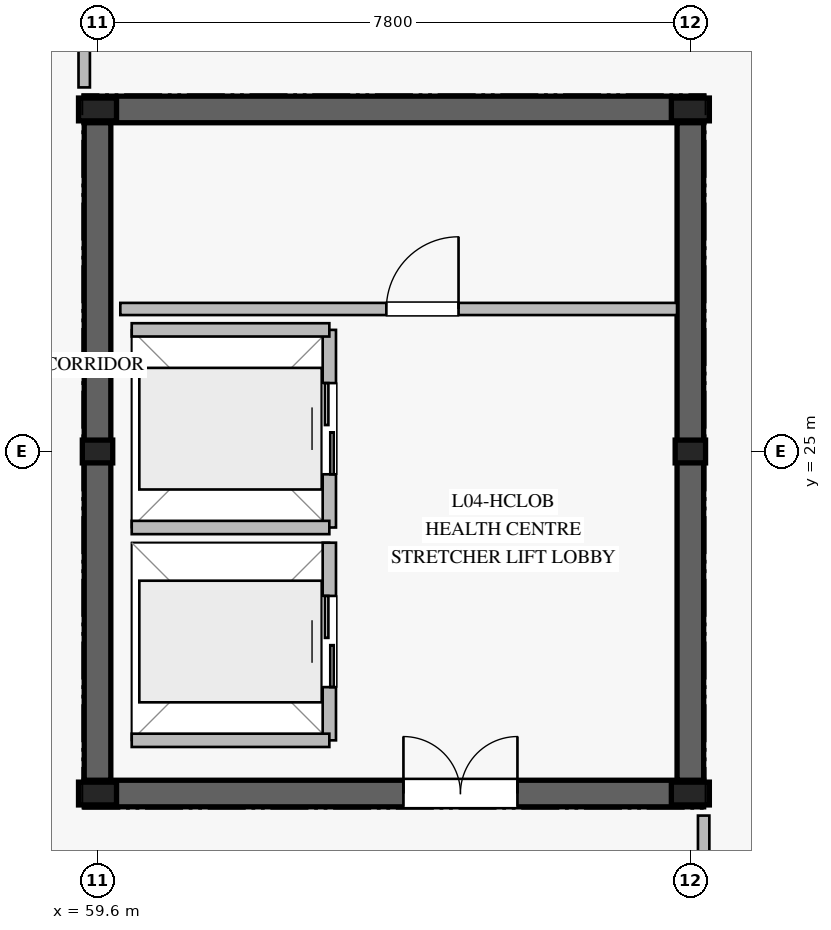
"""IFC4 building model, lengths in metres.
Left out: names, types, materials, properties, quantities, classifications, styles, units other than length and angle.
Written with IfcOpenShell. Run it as: python <this file> out.ifc"""

import sys

from ifc_helpers import new_model, si_unit, direction, frame, frame_2d, origin, origin_2d, place, context, subcontext, project, spatial, rectangle, i_section, extrude, element, fill, save


model = new_model("IFC4")
c1 = context("Model", 3, precision=1e-05, world=origin(), true_north=direction((0.0, 1.0)))
c2 = subcontext(c1, "Body", "Model", "MODEL_VIEW")
j1 = project(units=[si_unit("LENGTHUNIT", "METRE"), si_unit("PLANEANGLEUNIT", "RADIAN")], contexts=[c1])
p1 = place(None, origin())
s1 = spatial("IfcSite", under=j1, at=p1, CompositionType="ELEMENT")
p2 = place(p1, origin())
s2 = spatial("IfcBuilding", under=s1, at=p2, CompositionType="ELEMENT")
p3 = place(p2, frame((0.0, 0.0, 19.0)))
s3 = spatial("IfcBuildingStorey", under=s2, at=p3, CompositionType="ELEMENT", Elevation=19.0)
p4 = place(p3, frame((59.425, 20.5, 0.0), z_axis=(0.0, 0.0, 1.0), x_axis=(1.0, 0.0, 0.0)))
e1 = element("IfcWall", 1, at=p4, inside=s3, PredefinedType="SHEAR", context=c2, shape_type="SweptSolid", body=[
    extrude(rectangle(XDim=8.15, YDim=0.35, at=frame_2d((4.075, 0.0))), origin(), (0.0, 0.0, 1.0), 4.73),
])
p5 = place(p4, frame((4.2, 0.0, 0.0)))
e2 = element("IfcOpeningElement", 2, at=p5, cuts=e1, PredefinedType="OPENING", context=c2, shape_type="SweptSolid", body=[
    extrude(rectangle(XDim=1.5, YDim=2.2, at=frame_2d((0.75, 1.1))), frame((0.0, 0.185, 0.0), z_axis=(0.0, -1.0, 0.0), x_axis=(1.0, 0.0, 0.0)), (0.0, 0.0, 1.0), 0.37),
])
p6 = place(p3, frame((67.575, 29.5, 0.0), z_axis=(0.0, 0.0, 1.0), x_axis=(-1.0, 0.0, 0.0)))
e3 = element("IfcWall", 3, at=p6, inside=s3, PredefinedType="SHEAR", context=c2, shape_type="SweptSolid", body=[
    extrude(rectangle(XDim=8.15, YDim=0.35, at=frame_2d((4.075, 0.0))), origin(), (0.0, 0.0, 1.0), 4.73),
])
for number, where, z_axis, x_axis in (
    (4, (59.6, 29.325, 0.0), (0.0, 0.0, 1.0), (0.0, -1.0, 0.0)),
    (5, (67.4, 20.675, 0.0), (0.0, 0.0, 1.0), (0.0, 1.0, 0.0)),
):
    element("IfcWall", number, at=place(p3, frame(where, z_axis=z_axis, x_axis=x_axis)), inside=s3, PredefinedType="SHEAR", context=c2, shape_type="SweptSolid", body=[
        extrude(rectangle(XDim=8.65, YDim=0.35, at=frame_2d((4.325, 0.0))), origin(), (0.0, 0.0, 1.0), 4.73),
    ])
for number, where, z_axis, x_axis in (
    (6, (59.6, 20.5, 0.0), (0.0, 0.0, 1.0), (1.0, 0.0, 0.0)),
    (7, (67.4, 20.5, 0.0), (0.0, 0.0, 1.0), (1.0, 0.0, 0.0)),
    (8, (67.4, 29.5, 0.0), (0.0, 0.0, 1.0), (1.0, 0.0, 0.0)),
    (9, (59.6, 29.5, 0.0), (0.0, 0.0, 1.0), (1.0, 0.0, 0.0)),
):
    element("IfcColumn", number, at=place(p3, frame(where, z_axis=z_axis, x_axis=x_axis)), inside=s3, PredefinedType="COLUMN", context=c2, shape_type="SweptSolid", body=[
        extrude(i_section(OverallWidth=0.3, OverallDepth=0.5, WebThickness=0.014, FlangeThickness=0.028, at=origin_2d()), origin(), (0.0, 0.0, 1.0), 5.0),
    ])
for number, where, z_axis, x_axis in (
    (10, (59.6, 25.0, 0.0), (0.0, 0.0, 1.0), (1.0, 0.0, 0.0)),
    (11, (67.4, 25.0, 0.0), (0.0, 0.0, 1.0), (1.0, 0.0, 0.0)),
):
    element("IfcColumn", number, at=place(p3, frame(where, z_axis=z_axis, x_axis=x_axis)), inside=s3, PredefinedType="COLUMN", context=c2, shape_type="SweptSolid", body=[
        extrude(i_section(OverallWidth=0.3, OverallDepth=0.4, WebThickness=0.013, FlangeThickness=0.024, at=origin_2d()), origin(), (0.0, 0.0, 1.0), 4.77),
    ])
p7 = place(p3, frame((62.65, 21.2, 0.0), z_axis=(0.0, 0.0, 1.0), x_axis=(0.0, 1.0, 0.0)))
e12 = element("IfcWall", 12, at=p7, inside=s3, PredefinedType="PARTITIONING", context=c2, shape_type="SweptSolid", body=[
    extrude(rectangle(XDim=2.6, YDim=0.175, at=frame_2d((1.3, 0.0))), origin(), (0.0, 0.0, 1.0), 4.76),
])
p8 = place(p7, frame((0.7, 0.0, 0.0)))
e13 = element("IfcOpeningElement", 13, at=p8, cuts=e12, PredefinedType="OPENING", context=c2, shape_type="SweptSolid", body=[
    extrude(rectangle(XDim=1.2, YDim=2.2, at=frame_2d((0.6, 1.1))), frame((0.0, 0.098, 0.0), z_axis=(0.0, -1.0, 0.0), x_axis=(1.0, 0.0, 0.0)), (0.0, 0.0, 1.0), 0.195),
])
p9 = place(p3, frame((60.05, 21.2, 0.0), z_axis=(0.0, 0.0, 1.0), x_axis=(1.0, 0.0, 0.0)))
e14 = element("IfcWall", 14, at=p9, inside=s3, PredefinedType="PARTITIONING", context=c2, shape_type="SweptSolid", body=[
    extrude(rectangle(XDim=2.6, YDim=0.175, at=frame_2d((1.3, 0.0))), origin(), (0.0, 0.0, 1.0), 4.76),
])
p10 = place(p3, frame((62.65, 24.0, 0.0), z_axis=(0.0, 0.0, 1.0), x_axis=(0.0, 1.0, 0.0)))
e15 = element("IfcWall", 15, at=p10, inside=s3, PredefinedType="PARTITIONING", context=c2, shape_type="SweptSolid", body=[
    extrude(rectangle(XDim=2.6, YDim=0.175, at=frame_2d((1.3, 0.0))), origin(), (0.0, 0.0, 1.0), 4.41),
])
p11 = place(p10, frame((0.7, 0.0, 0.0)))
e16 = element("IfcOpeningElement", 16, at=p11, cuts=e15, PredefinedType="OPENING", context=c2, shape_type="SweptSolid", body=[
    extrude(rectangle(XDim=1.2, YDim=2.2, at=frame_2d((0.6, 1.1))), frame((0.0, 0.098, 0.0), z_axis=(0.0, -1.0, 0.0), x_axis=(1.0, 0.0, 0.0)), (0.0, 0.0, 1.0), 0.195),
])
for number, where, z_axis, x_axis in (
    (17, (60.05, 24.0, 0.0), (0.0, 0.0, 1.0), (1.0, 0.0, 0.0)),
    (18, (60.05, 26.6, 0.0), (0.0, 0.0, 1.0), (1.0, 0.0, 0.0)),
):
    element("IfcWall", number, at=place(p3, frame(where, z_axis=z_axis, x_axis=x_axis)), inside=s3, PredefinedType="PARTITIONING", context=c2, shape_type="SweptSolid", body=[
        extrude(rectangle(XDim=2.6, YDim=0.175, at=frame_2d((1.3, 0.0))), origin(), (0.0, 0.0, 1.0), 4.76),
    ])
p12 = place(p3, frame((59.9, 26.875, 0.0), z_axis=(0.0, 0.0, 1.0), x_axis=(1.0, 0.0, 0.0)))
e19 = element("IfcWall", 19, at=p12, inside=s3, PredefinedType="PLUMBINGWALL", context=c2, shape_type="SweptSolid", body=[
    extrude(rectangle(XDim=7.325, YDim=0.16, at=frame_2d((3.663, 0.0))), origin(), (0.0, 0.0, 1.0), 4.41),
])
p13 = place(p12, frame((3.5, 0.0, 0.0)))
e20 = element("IfcOpeningElement", 20, at=p13, cuts=e19, PredefinedType="OPENING", context=c2, shape_type="SweptSolid", body=[
    extrude(rectangle(XDim=0.95, YDim=2.1, at=frame_2d((0.475, 1.05))), frame((0.0, 0.09, 0.0), z_axis=(0.0, -1.0, 0.0), x_axis=(1.0, 0.0, 0.0)), (0.0, 0.0, 1.0), 0.18),
])
p14 = place(p3, frame((59.425, 29.79, 0.0), z_axis=(0.0, 0.0, 1.0), x_axis=(0.0, 1.0, 0.0)))
e21 = element("IfcWall", 21, at=p14, inside=s3, PredefinedType="PARTITIONING", context=c2, shape_type="SweptSolid", body=[
    extrude(rectangle(XDim=0.97, YDim=0.15, at=frame_2d((0.485, 0.0))), origin(), (0.0, 0.0, 1.0), 4.41),
])
p15 = place(p3, frame((67.575, 19.24, 0.0), z_axis=(0.0, 0.0, 1.0), x_axis=(0.0, 1.0, 0.0)))
e22 = element("IfcWall", 22, at=p15, inside=s3, PredefinedType="PARTITIONING", context=c2, shape_type="SweptSolid", body=[
    extrude(rectangle(XDim=0.97, YDim=0.15, at=frame_2d((0.485, 0.0))), origin(), (0.0, 0.0, 1.0), 4.37),
])
p16 = place(p8, origin())
e23 = element("IfcDoor", 23, at=p16, inside=s3, OperationType="DOUBLE_DOOR_SLIDING", PredefinedType="DOOR", context=c2, shape_type="SweptSolid", body=[
    extrude(rectangle(XDim=1.2, YDim=2.2, at=frame_2d((0.6, 1.1))), frame((0.0, 0.025, 0.0), z_axis=(0.0, -1.0, 0.0), x_axis=(1.0, 0.0, 0.0)), (0.0, 0.0, 1.0), 0.05),
])
fill(e13, e23)
p17 = place(p11, origin())
e24 = element("IfcDoor", 24, at=p17, inside=s3, OperationType="DOUBLE_DOOR_SLIDING", PredefinedType="DOOR", context=c2, shape_type="SweptSolid", body=[
    extrude(rectangle(XDim=1.2, YDim=2.2, at=frame_2d((0.6, 1.1))), frame((0.0, 0.025, 0.0), z_axis=(0.0, -1.0, 0.0), x_axis=(1.0, 0.0, 0.0)), (0.0, 0.0, 1.0), 0.05),
])
fill(e16, e24)
p18 = place(p5, origin())
e25 = element("IfcDoor", 25, at=p18, inside=s3, OperationType="DOUBLE_DOOR_SINGLE_SWING", PredefinedType="DOOR", context=c2, shape_type="SweptSolid", body=[
    extrude(rectangle(XDim=1.5, YDim=2.2, at=frame_2d((0.75, 1.1))), frame((0.0, 0.025, 0.0), z_axis=(0.0, -1.0, 0.0), x_axis=(1.0, 0.0, 0.0)), (0.0, 0.0, 1.0), 0.05),
])
fill(e2, e25)
p19 = place(p13, origin())
e26 = element("IfcDoor", 26, at=p19, inside=s3, OperationType="SINGLE_SWING_RIGHT", PredefinedType="DOOR", context=c2, shape_type="SweptSolid", body=[
    extrude(rectangle(XDim=0.95, YDim=2.1, at=frame_2d((0.475, 1.05))), frame((0.0, 0.025, 0.0), z_axis=(0.0, -1.0, 0.0), x_axis=(1.0, 0.0, 0.0)), (0.0, 0.0, 1.0), 0.05),
])
fill(e20, e26)
save(model, sys.argv[1])
